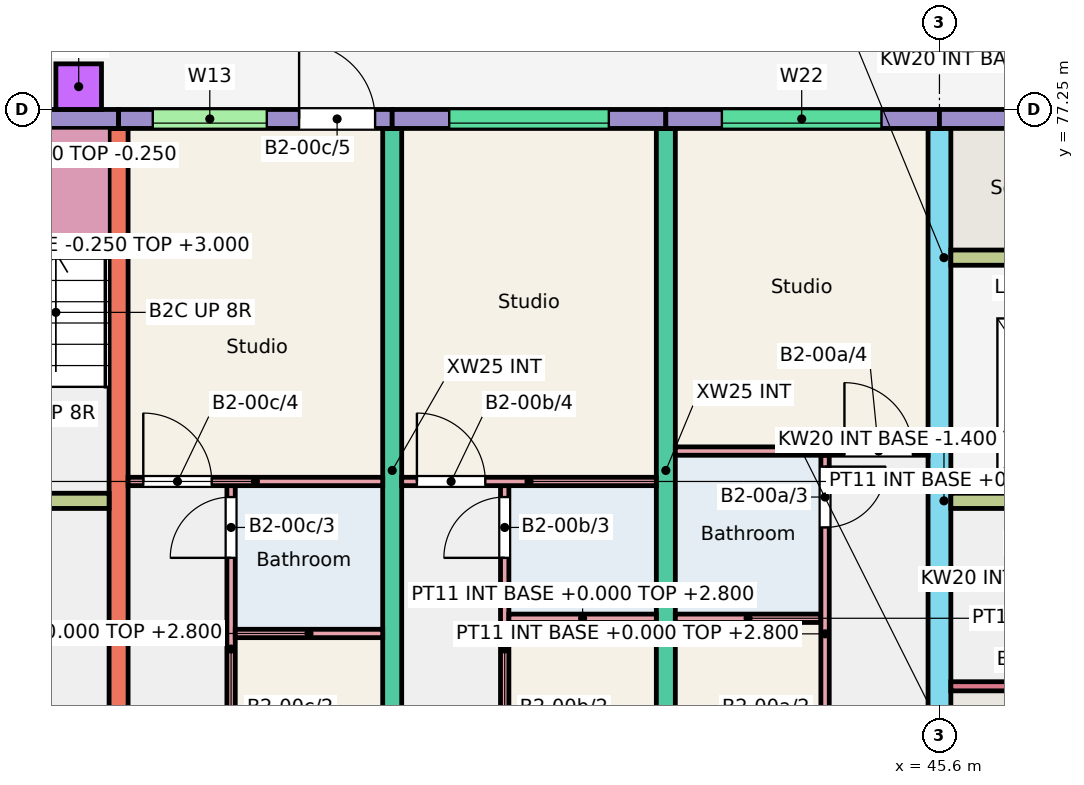
"""IFC4 building model, lengths in metres.
Left out: names, types, materials, properties, quantities, classifications, styles, units other than length and angle.
Written with IfcOpenShell. Run it as: python <this file> out.ifc"""

import sys

from ifc_helpers import new_model, si_unit, direction, frame, frame_2d, origin, origin_2d, place, context, subcontext, project, spatial, rectangle, extrude, element, fill, save


model = new_model("IFC4")
c1 = context("Model", 3, precision=1e-05, world=origin(), true_north=direction((0.0, 1.0)))
c2 = subcontext(c1, "Body", "Model", "MODEL_VIEW")
j1 = project(units=[si_unit("LENGTHUNIT", "METRE"), si_unit("PLANEANGLEUNIT", "RADIAN")], contexts=[c1])
p1 = place(None, origin())
s1 = spatial("IfcSite", under=j1, at=p1, CompositionType="ELEMENT")
p2 = place(p1, origin())
s2 = spatial("IfcBuilding", under=s1, at=p2, CompositionType="ELEMENT")
p3 = place(p2, origin())
s3 = spatial("IfcBuildingStorey", under=s2, at=p3, CompositionType="ELEMENT", Elevation=0.0)
for number, where, z_axis, x_axis in (
    (1, (34.8, 68.0, -0.25), (0.0, 0.0, 1.0), (0.0, 1.0, 0.0)),
    (2, (38.4, 68.0, -0.25), (0.0, 0.0, 1.0), (0.0, 1.0, 0.0)),
    (3, (42.0, 68.0, -0.25), (0.0, 0.0, 1.0), (0.0, 1.0, 0.0)),
):
    element("IfcWall", number, at=place(p3, frame(where, z_axis=z_axis, x_axis=x_axis)), inside=s3, PredefinedType="SHEAR", context=c2, shape_type="SweptSolid", body=[
        extrude(rectangle(XDim=9.0, YDim=0.25, at=frame_2d((4.5, 0.0))), origin(), (0.0, 0.0, 1.0), 3.25),
    ])
p4 = place(p3, frame((45.6, 66.0, -0.25), z_axis=(0.0, 0.0, 1.0), x_axis=(0.0, 1.0, 0.0)))
e4 = element("IfcWall", 4, at=p4, inside=s3, PredefinedType="SHEAR", context=c2, shape_type="SweptSolid", body=[
    extrude(rectangle(XDim=11.0, YDim=0.3, at=frame_2d((5.5, 0.0))), origin(), (0.0, 0.0, 1.0), 3.25),
])
p5 = place(p4, frame((0.3, 0.0, 0.25)))
e5 = element("IfcOpeningElement", 5, at=p5, cuts=e4, PredefinedType="OPENING", context=c2, shape_type="SweptSolid", body=[
    extrude(rectangle(XDim=1.2, YDim=2.1, at=frame_2d((0.6, 1.05))), frame((0.0, 0.16, 0.0), z_axis=(0.0, -1.0, 0.0), x_axis=(1.0, 0.0, 0.0)), (0.0, 0.0, 1.0), 0.32),
])
p6 = place(p3, frame((28.8, 77.125, -0.25), z_axis=(0.0, 0.0, 1.0), x_axis=(1.0, 0.0, 0.0)))
e6 = element("IfcWall", 6, at=p6, inside=s3, PredefinedType="SOLIDWALL", context=c2, shape_type="SweptSolid", body=[
    extrude(rectangle(XDim=6.0, YDim=0.25, at=frame_2d((3.0, 0.0))), origin(), (0.0, 0.0, 1.0), 3.25),
])
p7 = place(p6, frame((3.875, 0.0, 0.25)))
e7 = element("IfcOpeningElement", 7, at=p7, cuts=e6, PredefinedType="OPENING", context=c2, shape_type="SweptSolid", body=[
    extrude(rectangle(XDim=1.1, YDim=2.1, at=frame_2d((0.55, 1.05))), frame((0.0, 0.135, 0.0), z_axis=(0.0, -1.0, 0.0), x_axis=(1.0, 0.0, 0.0)), (0.0, 0.0, 1.0), 0.27),
])
p8 = place(p3, frame((28.95, 72.1, -0.25), z_axis=(0.0, 0.0, 1.0), x_axis=(1.0, 0.0, 0.0)))
e8 = element("IfcWall", 8, at=p8, inside=s3, PredefinedType="SHEAR", context=c2, shape_type="SweptSolid", body=[
    extrude(rectangle(XDim=5.725, YDim=0.2, at=frame_2d((2.863, 0.0))), origin(), (0.0, 0.0, 1.0), 3.25),
])
p9 = place(p8, frame((3.775, 0.0, 0.25)))
e9 = element("IfcOpeningElement", 9, at=p9, cuts=e8, PredefinedType="OPENING", context=c2, shape_type="SweptSolid", body=[
    extrude(rectangle(XDim=1.0, YDim=2.1, at=frame_2d((0.5, 1.05))), frame((0.0, 0.11, 0.0), z_axis=(0.0, -1.0, 0.0), x_axis=(1.0, 0.0, 0.0)), (0.0, 0.0, 1.0), 0.22),
])
p10 = place(p8, frame((0.762, 0.0, 0.25)))
e10 = element("IfcOpeningElement", 10, at=p10, cuts=e8, PredefinedType="OPENING", context=c2, shape_type="SweptSolid", body=[
    extrude(rectangle(XDim=1.1, YDim=2.1, at=frame_2d((0.55, 1.05))), frame((0.0, 0.11, 0.0), z_axis=(0.0, -1.0, 0.0), x_axis=(1.0, 0.0, 0.0)), (0.0, 0.0, 1.0), 0.22),
])
p11 = place(p3, frame((34.8, 77.125, -0.25), z_axis=(0.0, 0.0, 1.0), x_axis=(1.0, 0.0, 0.0)))
e11 = element("IfcWall", 11, at=p11, inside=s3, PredefinedType="SOLIDWALL", context=c2, shape_type="SweptSolid", body=[
    extrude(rectangle(XDim=3.6, YDim=0.25, at=frame_2d((1.8, 0.0))), origin(), (0.0, 0.0, 1.0), 3.25),
])
p12 = place(p11, frame((0.45, 0.0, 1.45)))
e12 = element("IfcOpeningElement", 12, at=p12, cuts=e11, PredefinedType="OPENING", context=c2, shape_type="SweptSolid", body=[
    extrude(rectangle(XDim=1.5, YDim=1.2, at=frame_2d((0.75, 0.6))), frame((0.0, 0.135, 0.0), z_axis=(0.0, -1.0, 0.0), x_axis=(1.0, 0.0, 0.0)), (0.0, 0.0, 1.0), 0.27),
])
p13 = place(p11, frame((2.375, 0.0, 0.25)))
e13 = element("IfcOpeningElement", 13, at=p13, cuts=e11, PredefinedType="OPENING", context=c2, shape_type="SweptSolid", body=[
    extrude(rectangle(XDim=1.0, YDim=2.1, at=frame_2d((0.5, 1.05))), frame((0.0, 0.135, 0.0), z_axis=(0.0, -1.0, 0.0), x_axis=(1.0, 0.0, 0.0)), (0.0, 0.0, 1.0), 0.27),
])
p14 = place(p3, frame((38.4, 77.125, -0.25), z_axis=(0.0, 0.0, 1.0), x_axis=(1.0, 0.0, 0.0)))
e14 = element("IfcWall", 14, at=p14, inside=s3, PredefinedType="SOLIDWALL", context=c2, shape_type="SweptSolid", body=[
    extrude(rectangle(XDim=3.6, YDim=0.25, at=frame_2d((1.8, 0.0))), origin(), (0.0, 0.0, 1.0), 3.25),
])
p15 = place(p14, frame((0.75, 0.0, 1.45)))
e15 = element("IfcOpeningElement", 15, at=p15, cuts=e14, PredefinedType="OPENING", context=c2, shape_type="SweptSolid", body=[
    extrude(rectangle(XDim=2.1, YDim=1.2, at=frame_2d((1.05, 0.6))), frame((0.0, 0.135, 0.0), z_axis=(0.0, -1.0, 0.0), x_axis=(1.0, 0.0, 0.0)), (0.0, 0.0, 1.0), 0.27),
])
p16 = place(p3, frame((42.0, 77.125, -0.25), z_axis=(0.0, 0.0, 1.0), x_axis=(1.0, 0.0, 0.0)))
e16 = element("IfcWall", 16, at=p16, inside=s3, PredefinedType="SOLIDWALL", context=c2, shape_type="SweptSolid", body=[
    extrude(rectangle(XDim=3.6, YDim=0.25, at=frame_2d((1.8, 0.0))), origin(), (0.0, 0.0, 1.0), 3.25),
])
p17 = place(p16, frame((0.738, 0.0, 1.45)))
e17 = element("IfcOpeningElement", 17, at=p17, cuts=e16, PredefinedType="OPENING", context=c2, shape_type="SweptSolid", body=[
    extrude(rectangle(XDim=2.1, YDim=1.2, at=frame_2d((1.05, 0.6))), frame((0.0, 0.135, 0.0), z_axis=(0.0, -1.0, 0.0), x_axis=(1.0, 0.0, 0.0)), (0.0, 0.0, 1.0), 0.27),
])
p18 = place(p3, frame((45.6, 77.125, -0.25), z_axis=(0.0, 0.0, 1.0), x_axis=(1.0, 0.0, 0.0)))
e18 = element("IfcWall", 18, at=p18, inside=s3, PredefinedType="SOLIDWALL", context=c2, shape_type="SweptSolid", body=[
    extrude(rectangle(XDim=6.0, YDim=0.25, at=frame_2d((3.0, 0.0))), origin(), (0.0, 0.0, 1.0), 3.25),
])
p19 = place(p18, frame((3.875, 0.0, 0.25)))
e19 = element("IfcOpeningElement", 19, at=p19, cuts=e18, PredefinedType="OPENING", context=c2, shape_type="SweptSolid", body=[
    extrude(rectangle(XDim=1.1, YDim=2.1, at=frame_2d((0.55, 1.05))), frame((0.0, 0.135, 0.0), z_axis=(0.0, -1.0, 0.0), x_axis=(1.0, 0.0, 0.0)), (0.0, 0.0, 1.0), 0.27),
])
p20 = place(p3, frame((45.75, 72.1, -0.25), z_axis=(0.0, 0.0, 1.0), x_axis=(1.0, 0.0, 0.0)))
e20 = element("IfcWall", 20, at=p20, inside=s3, PredefinedType="SHEAR", context=c2, shape_type="SweptSolid", body=[
    extrude(rectangle(XDim=5.725, YDim=0.2, at=frame_2d((2.863, 0.0))), origin(), (0.0, 0.0, 1.0), 3.25),
])
p21 = place(p20, frame((3.775, 0.0, 0.25)))
e21 = element("IfcOpeningElement", 21, at=p21, cuts=e20, PredefinedType="OPENING", context=c2, shape_type="SweptSolid", body=[
    extrude(rectangle(XDim=1.0, YDim=2.1, at=frame_2d((0.5, 1.05))), frame((0.0, 0.11, 0.0), z_axis=(0.0, -1.0, 0.0), x_axis=(1.0, 0.0, 0.0)), (0.0, 0.0, 1.0), 0.22),
])
p22 = place(p20, frame((0.762, 0.0, 0.25)))
e22 = element("IfcOpeningElement", 22, at=p22, cuts=e20, PredefinedType="OPENING", context=c2, shape_type="SweptSolid", body=[
    extrude(rectangle(XDim=1.1, YDim=2.1, at=frame_2d((0.55, 1.05))), frame((0.0, 0.11, 0.0), z_axis=(0.0, -1.0, 0.0), x_axis=(1.0, 0.0, 0.0)), (0.0, 0.0, 1.0), 0.22),
])
p23 = place(p3, frame((45.75, 75.3, -0.25), z_axis=(0.0, 0.0, 1.0), x_axis=(1.0, 0.0, 0.0)))
e23 = element("IfcWall", 23, at=p23, inside=s3, PredefinedType="SHEAR", context=c2, shape_type="SweptSolid", body=[
    extrude(rectangle(XDim=2.625, YDim=0.2, at=frame_2d((1.312, 0.0))), origin(), (0.0, 0.0, 1.0), 3.25),
])
p24 = place(p3, frame((45.75, 69.66, -0.25), z_axis=(0.0, 0.0, 1.0), x_axis=(1.0, 0.0, 0.0)))
e24 = element("IfcWall", 24, at=p24, inside=s3, PredefinedType="SHEAR", context=c2, shape_type="SweptSolid", body=[
    extrude(rectangle(XDim=1.13, YDim=0.12, at=frame_2d((0.565, 0.0))), origin(), (0.0, 0.0, 1.0), 3.25),
])
for number, where, z_axis, x_axis in (
    (25, (45.6, 72.1, -1.4), (0.0, 0.0, 1.0), (1.0, 0.0, 0.0)),
    (26, (45.6, 75.3, -1.4), (0.0, 0.0, 1.0), (1.0, 0.0, 0.0)),
):
    element("IfcWall", number, at=place(p3, frame(where, z_axis=z_axis, x_axis=x_axis)), inside=s3, PredefinedType="SHEAR", context=c2, shape_type="SweptSolid", body=[
        extrude(rectangle(XDim=2.975, YDim=0.2, at=frame_2d((1.487, 0.0))), origin(), (0.0, 0.0, 1.0), 1.15),
    ])
p25 = place(p3, frame((45.675, 72.2, -1.4), z_axis=(0.0, 0.0, 1.0), x_axis=(0.0, 1.0, 0.0)))
e27 = element("IfcWall", 27, at=p25, inside=s3, PredefinedType="SHEAR", context=c2, shape_type="SweptSolid", body=[
    extrude(rectangle(XDim=3.0, YDim=0.15, at=frame_2d((1.5, 0.0))), origin(), (0.0, 0.0, 1.0), 1.15),
])
p26 = place(p3, frame((34.275, 77.55, -0.25), z_axis=(0.0, 0.0, 1.0), x_axis=(1.0, 0.0, 0.0)))
e28 = element("IfcColumn", 28, at=p26, inside=s3, PredefinedType="COLUMN", context=c2, shape_type="SweptSolid", body=[
    extrude(rectangle(XDim=0.6, YDim=0.6, at=origin_2d()), origin(), (0.0, 0.0, 1.0), 3.15),
])
p27 = place(p3, frame((42.125, 70.555, 0.0), z_axis=(0.0, 0.0, 1.0), x_axis=(1.0, 0.0, 0.0)))
e29 = element("IfcWall", 29, at=p27, inside=s3, PredefinedType="PARTITIONING", context=c2, shape_type="SweptSolid", body=[
    extrude(rectangle(XDim=1.915, YDim=0.11, at=frame_2d((0.958, 0.0))), origin(), (0.0, 0.0, 1.0), 2.8),
])
p28 = place(p3, frame((44.095, 68.0, 0.0), z_axis=(0.0, 0.0, 1.0), x_axis=(0.0, 1.0, 0.0)))
e30 = element("IfcWall", 30, at=p28, inside=s3, PredefinedType="PARTITIONING", context=c2, shape_type="SweptSolid", body=[
    extrude(rectangle(XDim=4.7, YDim=0.11, at=frame_2d((2.35, 0.0))), origin(), (0.0, 0.0, 1.0), 2.8),
])
p29 = place(p28, frame((0.2, 0.0, 0.0)))
e31 = element("IfcOpeningElement", 31, at=p29, cuts=e30, PredefinedType="OPENING", context=c2, shape_type="SweptSolid", body=[
    extrude(rectangle(XDim=0.8, YDim=2.1, at=frame_2d((0.4, 1.05))), frame((0.0, 0.065, 0.0), z_axis=(0.0, -1.0, 0.0), x_axis=(1.0, 0.0, 0.0)), (0.0, 0.0, 1.0), 0.13),
])
p30 = place(p28, frame((3.75, 0.0, 0.0)))
e32 = element("IfcOpeningElement", 32, at=p30, cuts=e30, PredefinedType="OPENING", context=c2, shape_type="SweptSolid", body=[
    extrude(rectangle(XDim=0.8, YDim=2.1, at=frame_2d((0.4, 1.05))), frame((0.0, 0.065, 0.0), z_axis=(0.0, -1.0, 0.0), x_axis=(1.0, 0.0, 0.0)), (0.0, 0.0, 1.0), 0.13),
])
p31 = place(p3, frame((42.125, 72.755, 0.0), z_axis=(0.0, 0.0, 1.0), x_axis=(1.0, 0.0, 0.0)))
e33 = element("IfcWall", 33, at=p31, inside=s3, PredefinedType="PARTITIONING", context=c2, shape_type="SweptSolid", body=[
    extrude(rectangle(XDim=3.325, YDim=0.11, at=frame_2d((1.663, 0.0))), origin(), (0.0, 0.0, 1.0), 2.8),
])
p32 = place(p31, frame((2.225, 0.0, 0.0)))
e34 = element("IfcOpeningElement", 34, at=p32, cuts=e33, PredefinedType="OPENING", context=c2, shape_type="SweptSolid", body=[
    extrude(rectangle(XDim=0.9, YDim=2.1, at=frame_2d((0.45, 1.05))), frame((0.0, 0.065, 0.0), z_axis=(0.0, -1.0, 0.0), x_axis=(1.0, 0.0, 0.0)), (0.0, 0.0, 1.0), 0.13),
])
p33 = place(p3, frame((39.88, 68.0, 0.0), z_axis=(0.0, 0.0, 1.0), x_axis=(0.0, 1.0, 0.0)))
e35 = element("IfcWall", 35, at=p33, inside=s3, PredefinedType="PARTITIONING", context=c2, shape_type="SweptSolid", body=[
    extrude(rectangle(XDim=4.3, YDim=0.11, at=frame_2d((2.15, 0.0))), origin(), (0.0, 0.0, 1.0), 2.8),
])
p34 = place(p33, frame((0.2, 0.0, 0.0)))
e36 = element("IfcOpeningElement", 36, at=p34, cuts=e35, PredefinedType="OPENING", context=c2, shape_type="SweptSolid", body=[
    extrude(rectangle(XDim=0.8, YDim=2.1, at=frame_2d((0.4, 1.05))), frame((0.0, 0.065, 0.0), z_axis=(0.0, -1.0, 0.0), x_axis=(1.0, 0.0, 0.0)), (0.0, 0.0, 1.0), 0.13),
])
p35 = place(p33, frame((3.35, 0.0, 0.0)))
e37 = element("IfcOpeningElement", 37, at=p35, cuts=e35, PredefinedType="OPENING", context=c2, shape_type="SweptSolid", body=[
    extrude(rectangle(XDim=0.8, YDim=2.1, at=frame_2d((0.4, 1.05))), frame((0.0, 0.065, 0.0), z_axis=(0.0, -1.0, 0.0), x_axis=(1.0, 0.0, 0.0)), (0.0, 0.0, 1.0), 0.13),
])
p36 = place(p3, frame((39.935, 70.555, 0.0), z_axis=(0.0, 0.0, 1.0), x_axis=(1.0, 0.0, 0.0)))
e38 = element("IfcWall", 38, at=p36, inside=s3, PredefinedType="PARTITIONING", context=c2, shape_type="SweptSolid", body=[
    extrude(rectangle(XDim=1.94, YDim=0.11, at=frame_2d((0.97, 0.0))), origin(), (0.0, 0.0, 1.0), 2.8),
])
p37 = place(p3, frame((38.525, 72.355, 0.0), z_axis=(0.0, 0.0, 1.0), x_axis=(1.0, 0.0, 0.0)))
e39 = element("IfcWall", 39, at=p37, inside=s3, PredefinedType="PARTITIONING", context=c2, shape_type="SweptSolid", body=[
    extrude(rectangle(XDim=3.35, YDim=0.11, at=frame_2d((1.675, 0.0))), origin(), (0.0, 0.0, 1.0), 2.8),
])
p38 = place(p37, frame((0.2, 0.0, 0.0)))
e40 = element("IfcOpeningElement", 40, at=p38, cuts=e39, PredefinedType="OPENING", context=c2, shape_type="SweptSolid", body=[
    extrude(rectangle(XDim=0.9, YDim=2.1, at=frame_2d((0.45, 1.05))), frame((0.0, 0.065, 0.0), z_axis=(0.0, -1.0, 0.0), x_axis=(1.0, 0.0, 0.0)), (0.0, 0.0, 1.0), 0.13),
])
p39 = place(p3, frame((36.28, 68.0, 0.0), z_axis=(0.0, 0.0, 1.0), x_axis=(0.0, 1.0, 0.0)))
e41 = element("IfcWall", 41, at=p39, inside=s3, PredefinedType="PARTITIONING", context=c2, shape_type="SweptSolid", body=[
    extrude(rectangle(XDim=4.3, YDim=0.11, at=frame_2d((2.15, 0.0))), origin(), (0.0, 0.0, 1.0), 2.8),
])
p40 = place(p39, frame((0.2, 0.0, 0.0)))
e42 = element("IfcOpeningElement", 42, at=p40, cuts=e41, PredefinedType="OPENING", context=c2, shape_type="SweptSolid", body=[
    extrude(rectangle(XDim=0.8, YDim=2.1, at=frame_2d((0.4, 1.05))), frame((0.0, 0.065, 0.0), z_axis=(0.0, -1.0, 0.0), x_axis=(1.0, 0.0, 0.0)), (0.0, 0.0, 1.0), 0.13),
])
p41 = place(p39, frame((3.35, 0.0, 0.0)))
e43 = element("IfcOpeningElement", 43, at=p41, cuts=e41, PredefinedType="OPENING", context=c2, shape_type="SweptSolid", body=[
    extrude(rectangle(XDim=0.8, YDim=2.1, at=frame_2d((0.4, 1.05))), frame((0.0, 0.065, 0.0), z_axis=(0.0, -1.0, 0.0), x_axis=(1.0, 0.0, 0.0)), (0.0, 0.0, 1.0), 0.13),
])
p42 = place(p3, frame((36.335, 70.355, 0.0), z_axis=(0.0, 0.0, 1.0), x_axis=(1.0, 0.0, 0.0)))
e44 = element("IfcWall", 44, at=p42, inside=s3, PredefinedType="PARTITIONING", context=c2, shape_type="SweptSolid", body=[
    extrude(rectangle(XDim=1.94, YDim=0.11, at=frame_2d((0.97, 0.0))), origin(), (0.0, 0.0, 1.0), 2.8),
])
p43 = place(p3, frame((34.925, 72.355, 0.0), z_axis=(0.0, 0.0, 1.0), x_axis=(1.0, 0.0, 0.0)))
e45 = element("IfcWall", 45, at=p43, inside=s3, PredefinedType="PARTITIONING", context=c2, shape_type="SweptSolid", body=[
    extrude(rectangle(XDim=3.35, YDim=0.11, at=frame_2d((1.675, 0.0))), origin(), (0.0, 0.0, 1.0), 2.8),
])
p44 = place(p43, frame((0.2, 0.0, 0.0)))
e46 = element("IfcOpeningElement", 46, at=p44, cuts=e45, PredefinedType="OPENING", context=c2, shape_type="SweptSolid", body=[
    extrude(rectangle(XDim=0.9, YDim=2.1, at=frame_2d((0.45, 1.05))), frame((0.0, 0.065, 0.0), z_axis=(0.0, -1.0, 0.0), x_axis=(1.0, 0.0, 0.0)), (0.0, 0.0, 1.0), 0.13),
])
p45 = place(p17, origin())
e47 = element("IfcWindow", 47, at=p45, inside=s3, PartitioningType="SINGLE_PANEL", PredefinedType="WINDOW", context=c2, shape_type="SweptSolid", body=[
    extrude(rectangle(XDim=2.1, YDim=1.2, at=frame_2d((1.05, 0.6))), frame((0.0, -0.025, 0.0), z_axis=(0.0, -1.0, 0.0), x_axis=(1.0, 0.0, 0.0)), (0.0, 0.0, 1.0), 0.06),
])
fill(e17, e47)
p46 = place(p15, origin())
e48 = element("IfcWindow", 48, at=p46, inside=s3, PartitioningType="SINGLE_PANEL", PredefinedType="WINDOW", context=c2, shape_type="SweptSolid", body=[
    extrude(rectangle(XDim=2.1, YDim=1.2, at=frame_2d((1.05, 0.6))), frame((0.0, -0.025, 0.0), z_axis=(0.0, -1.0, 0.0), x_axis=(1.0, 0.0, 0.0)), (0.0, 0.0, 1.0), 0.06),
])
fill(e15, e48)
p47 = place(p12, origin())
e49 = element("IfcWindow", 49, at=p47, inside=s3, PartitioningType="SINGLE_PANEL", PredefinedType="WINDOW", context=c2, shape_type="SweptSolid", body=[
    extrude(rectangle(XDim=1.5, YDim=1.2, at=frame_2d((0.75, 0.6))), frame((0.0, -0.025, 0.0), z_axis=(0.0, -1.0, 0.0), x_axis=(1.0, 0.0, 0.0)), (0.0, 0.0, 1.0), 0.06),
])
fill(e12, e49)
p48 = place(p30, origin())
e50 = element("IfcDoor", 50, at=p48, inside=s3, OperationType="SINGLE_SWING_RIGHT", PredefinedType="DOOR", context=c2, shape_type="SweptSolid", body=[
    extrude(rectangle(XDim=0.8, YDim=2.1, at=frame_2d((0.4, 1.05))), frame((0.0, 0.025, 0.0), z_axis=(0.0, -1.0, 0.0), x_axis=(1.0, 0.0, 0.0)), (0.0, 0.0, 1.0), 0.05),
])
fill(e32, e50)
p49 = place(p32, origin())
e51 = element("IfcDoor", 51, at=p49, inside=s3, OperationType="SINGLE_SWING_LEFT", PredefinedType="DOOR", context=c2, shape_type="SweptSolid", body=[
    extrude(rectangle(XDim=0.9, YDim=2.1, at=frame_2d((0.45, 1.05))), frame((0.0, 0.025, 0.0), z_axis=(0.0, -1.0, 0.0), x_axis=(1.0, 0.0, 0.0)), (0.0, 0.0, 1.0), 0.05),
])
fill(e34, e51)
p50 = place(p35, origin())
e52 = element("IfcDoor", 52, at=p50, inside=s3, OperationType="SINGLE_SWING_LEFT", PredefinedType="DOOR", context=c2, shape_type="SweptSolid", body=[
    extrude(rectangle(XDim=0.8, YDim=2.1, at=frame_2d((0.4, 1.05))), frame((0.0, 0.025, 0.0), z_axis=(0.0, -1.0, 0.0), x_axis=(1.0, 0.0, 0.0)), (0.0, 0.0, 1.0), 0.05),
])
fill(e37, e52)
p51 = place(p38, origin())
e53 = element("IfcDoor", 53, at=p51, inside=s3, OperationType="SINGLE_SWING_LEFT", PredefinedType="DOOR", context=c2, shape_type="SweptSolid", body=[
    extrude(rectangle(XDim=0.9, YDim=2.1, at=frame_2d((0.45, 1.05))), frame((0.0, 0.025, 0.0), z_axis=(0.0, -1.0, 0.0), x_axis=(1.0, 0.0, 0.0)), (0.0, 0.0, 1.0), 0.05),
])
fill(e40, e53)
p52 = place(p41, origin())
e54 = element("IfcDoor", 54, at=p52, inside=s3, OperationType="SINGLE_SWING_LEFT", PredefinedType="DOOR", context=c2, shape_type="SweptSolid", body=[
    extrude(rectangle(XDim=0.8, YDim=2.1, at=frame_2d((0.4, 1.05))), frame((0.0, 0.025, 0.0), z_axis=(0.0, -1.0, 0.0), x_axis=(1.0, 0.0, 0.0)), (0.0, 0.0, 1.0), 0.05),
])
fill(e43, e54)
p53 = place(p44, origin())
e55 = element("IfcDoor", 55, at=p53, inside=s3, OperationType="SINGLE_SWING_LEFT", PredefinedType="DOOR", context=c2, shape_type="SweptSolid", body=[
    extrude(rectangle(XDim=0.9, YDim=2.1, at=frame_2d((0.45, 1.05))), frame((0.0, 0.025, 0.0), z_axis=(0.0, -1.0, 0.0), x_axis=(1.0, 0.0, 0.0)), (0.0, 0.0, 1.0), 0.05),
])
fill(e46, e55)
p54 = place(p13, origin())
e56 = element("IfcDoor", 56, at=p54, inside=s3, OperationType="SINGLE_SWING_LEFT", PredefinedType="DOOR", context=c2, shape_type="SweptSolid", body=[
    extrude(rectangle(XDim=1.0, YDim=2.1, at=frame_2d((0.5, 1.05))), frame((0.0, 0.025, 0.0), z_axis=(0.0, -1.0, 0.0), x_axis=(1.0, 0.0, 0.0)), (0.0, 0.0, 1.0), 0.05),
])
fill(e13, e56)
save(model, sys.argv[1])
